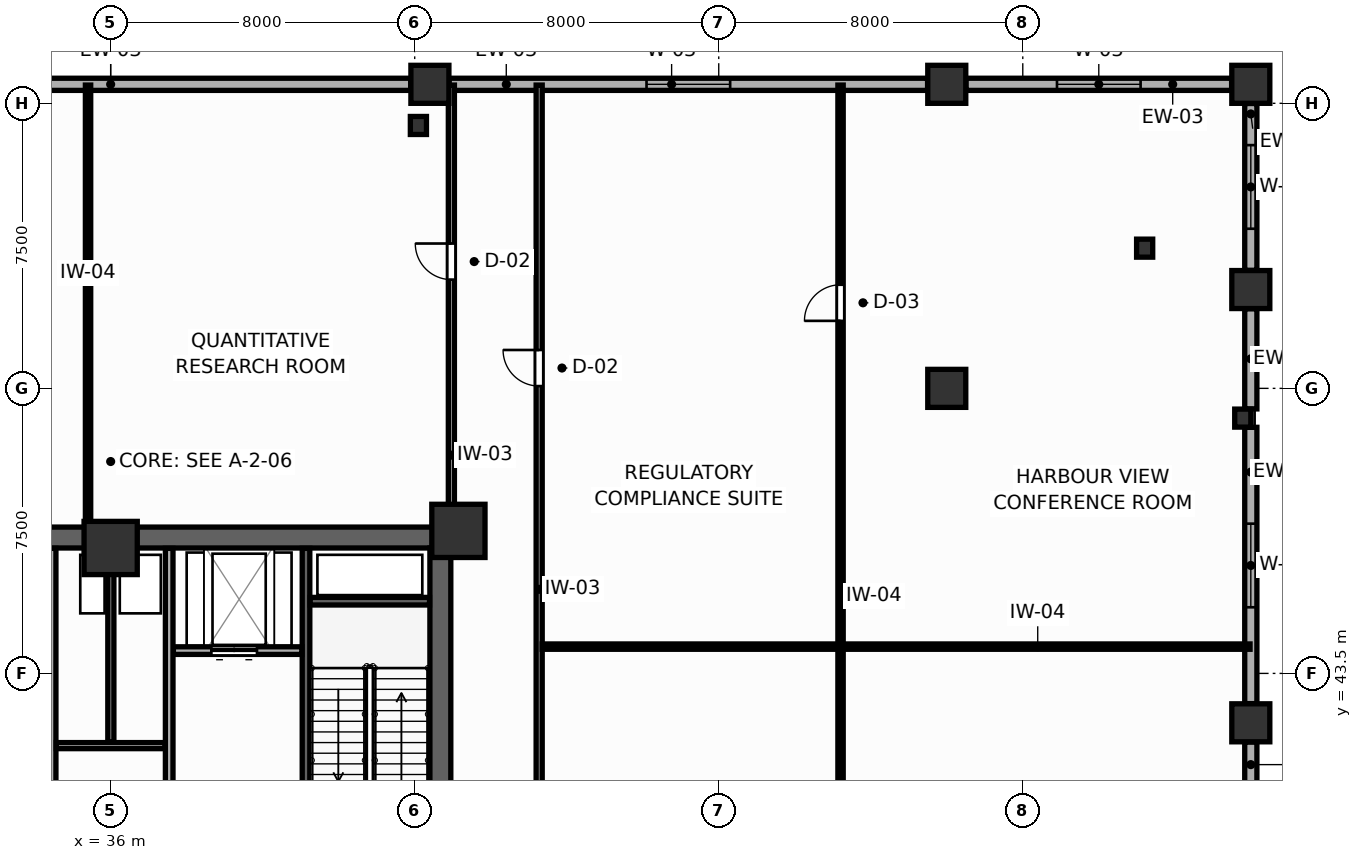
"""IFC4 building model, lengths in metres.
Left out: names, types, materials, properties, quantities, classifications, styles, units other than length and angle.
Written with IfcOpenShell. Run it as: python <this file> out.ifc"""

import sys

from ifc_helpers import new_model, si_unit, direction, frame, frame_2d, origin, origin_2d, place, context, subcontext, project, spatial, rectangle, i_section, extrude, source, transform, mapped, element, fill, save


model = new_model("IFC4")
c1 = context("Model", 3, precision=1e-05, world=origin(), true_north=direction((0.0, 1.0)))
c2 = subcontext(c1, "Body", "Model", "MODEL_VIEW")
j1 = project(units=[si_unit("LENGTHUNIT", "METRE"), si_unit("PLANEANGLEUNIT", "RADIAN")], contexts=[c1])
p1 = place(None, origin())
s1 = spatial("IfcSite", under=j1, at=p1, CompositionType="ELEMENT")
p2 = place(p1, origin())
s2 = spatial("IfcBuilding", under=s1, at=p2, CompositionType="ELEMENT")
p3 = place(p2, frame((0.0, 0.0, 14.4)))
s3 = spatial("IfcBuildingStorey", under=s2, at=p3, CompositionType="ELEMENT", Elevation=14.4)
p4 = place(p3, frame((27.05, 47.075, 0.0), z_axis=(0.0, 0.0, 1.0), x_axis=(1.0, 0.0, 0.0)))
e1 = element("IfcWall", 1, at=p4, inside=s3, PredefinedType="SHEAR", context=c2, shape_type="SweptSolid", body=[
    extrude(rectangle(XDim=17.9, YDim=0.55, at=frame_2d((8.95, 0.0))), origin(), (0.0, 0.0, 1.0), 4.8),
])
p5 = place(p3, frame((44.675, 37.8, 0.0), z_axis=(0.0, 0.0, 1.0), x_axis=(0.0, 1.0, 0.0)))
e2 = element("IfcWall", 2, at=p5, inside=s3, PredefinedType="SHEAR", context=c2, shape_type="SweptSolid", body=[
    extrude(rectangle(XDim=9.0, YDim=0.55, at=frame_2d((4.5, 0.0))), origin(), (0.0, 0.0, 1.0), 4.8),
])
m1 = source(origin(), c2, "Body", "SweptSolid", [
    extrude(rectangle(XDim=1.4, YDim=1.4, at=origin_2d()), origin(), (0.0, 0.0, 1.0), 4.8),
])
for number, where, z_axis, x_axis in (
    (3, (45.15, 47.25, 0.0), (0.0, 0.0, 1.0), (1.0, 0.0, 0.0)),
    (4, (36.0, 46.8, 0.0), (0.0, 0.0, 1.0), (1.0, 0.0, 0.0)),
):
    element("IfcColumn", number, at=place(p3, frame(where, z_axis=z_axis, x_axis=x_axis)), inside=s3, PredefinedType="COLUMN", context=c2, shape_type="MappedRepresentation", body=[
        mapped(m1, transform((0.0, 0.0, 0.0), scale=1.0)),
    ])
m2 = source(origin(), c2, "Body", "SweptSolid", [
    extrude(rectangle(XDim=1.0, YDim=1.0, at=origin_2d()), origin(), (0.0, 0.0, 1.0), 4.8),
])
for number, where, z_axis, x_axis in (
    (5, (66.0, 53.6, 0.0), (0.0, 0.0, 1.0), (1.0, 0.0, 0.0)),
    (6, (66.0, 59.0, 0.0), (0.0, 0.0, 1.0), (1.0, 0.0, 0.0)),
    (7, (44.4, 59.0, 0.0), (0.0, 0.0, 1.0), (1.0, 0.0, 0.0)),
    (8, (58.0, 59.0, 0.0), (0.0, 0.0, 1.0), (1.0, 0.0, 0.0)),
    (9, (58.0, 51.0, 0.0), (0.0, 0.0, 1.0), (1.0, 0.0, 0.0)),
    (10, (66.0, 42.2, 0.0), (0.0, 0.0, 1.0), (1.0, 0.0, 0.0)),
):
    element("IfcColumn", number, at=place(p3, frame(where, z_axis=z_axis, x_axis=x_axis)), inside=s3, PredefinedType="COLUMN", context=c2, shape_type="MappedRepresentation", body=[
        mapped(m2, transform((0.0, 0.0, 0.0), scale=1.0)),
    ])
m3 = source(origin(), c2, "Body", "SweptSolid", [
    extrude(i_section(OverallWidth=0.424, OverallDepth=0.474, WebThickness=0.045, FlangeThickness=0.072, FilletRadius=0.015, at=origin_2d()), origin(), (0.0, 0.0, 1.0), 4.8),
])
for number, where, z_axis, x_axis in (
    (11, (65.789, 50.217, 0.0), (0.0, 0.0, 1.0), (1.0, 0.0, 0.0)),
    (12, (63.207, 54.689, 0.0), (0.0, 0.0, 1.0), (1.0, 0.0, 0.0)),
    (13, (44.097, 57.917, 0.0), (0.0, 0.0, 1.0), (1.0, 0.0, 0.0)),
):
    element("IfcColumn", number, at=place(p3, frame(where, z_axis=z_axis, x_axis=x_axis)), inside=s3, PredefinedType="COLUMN", context=c2, shape_type="MappedRepresentation", body=[
        mapped(m3, transform((0.0, 0.0, 0.0), scale=1.0)),
    ])
p6 = place(p3, frame((28.105, 59.0, 0.0), z_axis=(0.0, 0.0, 1.0), x_axis=(1.0, 0.0, 0.0)))
e14 = element("IfcWall", 14, at=p6, inside=s3, PredefinedType="SOLIDWALL", context=c2, shape_type="SweptSolid", body=[
    extrude(rectangle(XDim=15.79, YDim=0.32, at=frame_2d((7.895, 0.0))), origin(), (0.0, 0.0, 1.0), 3.82),
])
p7 = place(p3, frame((44.905, 59.0, 0.0), z_axis=(0.0, 0.0, 1.0), x_axis=(1.0, 0.0, 0.0)))
e15 = element("IfcWall", 15, at=p7, inside=s3, PredefinedType="SOLIDWALL", context=c2, shape_type="SweptSolid", body=[
    extrude(rectangle(XDim=12.59, YDim=0.32, at=frame_2d((6.295, 0.0))), origin(), (0.0, 0.0, 1.0), 3.82),
])
p8 = place(p7, frame((5.195, 0.0, 0.75)))
e16 = element("IfcOpeningElement", 16, at=p8, cuts=e15, PredefinedType="OPENING", context=c2, shape_type="SweptSolid", body=[
    extrude(rectangle(XDim=2.2, YDim=2.0, at=frame_2d((1.1, 1.0))), frame((0.0, 0.17, 0.0), z_axis=(0.0, -1.0, 0.0), x_axis=(1.0, 0.0, 0.0)), (0.0, 0.0, 1.0), 0.34),
])
p9 = place(p3, frame((58.505, 59.0, 0.0), z_axis=(0.0, 0.0, 1.0), x_axis=(1.0, 0.0, 0.0)))
e17 = element("IfcWall", 17, at=p9, inside=s3, PredefinedType="SOLIDWALL", context=c2, shape_type="SweptSolid", body=[
    extrude(rectangle(XDim=6.99, YDim=0.32, at=frame_2d((3.495, 0.0))), origin(), (0.0, 0.0, 1.0), 3.82),
])
p10 = place(p9, frame((2.395, 0.0, 0.75)))
e18 = element("IfcOpeningElement", 18, at=p10, cuts=e17, PredefinedType="OPENING", context=c2, shape_type="SweptSolid", body=[
    extrude(rectangle(XDim=2.2, YDim=2.0, at=frame_2d((1.1, 1.0))), frame((0.0, 0.17, 0.0), z_axis=(0.0, -1.0, 0.0), x_axis=(1.0, 0.0, 0.0)), (0.0, 0.0, 1.0), 0.34),
])
p11 = place(p3, frame((66.0, 40.505, 0.0), z_axis=(0.0, 0.0, 1.0), x_axis=(0.0, 1.0, 0.0)))
e19 = element("IfcWall", 19, at=p11, inside=s3, PredefinedType="SOLIDWALL", context=c2, shape_type="SweptSolid", body=[
    extrude(rectangle(XDim=1.19, YDim=0.32, at=frame_2d((0.595, 0.0))), origin(), (0.0, 0.0, 1.0), 3.82),
])
p12 = place(p3, frame((66.0, 42.705, 0.0), z_axis=(0.0, 0.0, 1.0), x_axis=(0.0, 1.0, 0.0)))
e20 = element("IfcWall", 20, at=p12, inside=s3, PredefinedType="SOLIDWALL", context=c2, shape_type="SweptSolid", body=[
    extrude(rectangle(XDim=7.27, YDim=0.32, at=frame_2d((3.635, 0.0))), origin(), (0.0, 0.0, 1.0), 3.82),
])
p13 = place(p12, frame((2.535, 0.0, 0.75)))
e21 = element("IfcOpeningElement", 21, at=p13, cuts=e20, PredefinedType="OPENING", context=c2, shape_type="SweptSolid", body=[
    extrude(rectangle(XDim=2.2, YDim=2.0, at=frame_2d((1.1, 1.0))), frame((0.0, 0.17, 0.0), z_axis=(0.0, -1.0, 0.0), x_axis=(1.0, 0.0, 0.0)), (0.0, 0.0, 1.0), 0.34),
])
p14 = place(p3, frame((66.0, 50.459, 0.0), z_axis=(0.0, 0.0, 1.0), x_axis=(0.0, 1.0, 0.0)))
e22 = element("IfcWall", 22, at=p14, inside=s3, PredefinedType="SOLIDWALL", context=c2, shape_type="SweptSolid", body=[
    extrude(rectangle(XDim=2.636, YDim=0.32, at=frame_2d((1.318, 0.0))), origin(), (0.0, 0.0, 1.0), 3.82),
])
p15 = place(p3, frame((66.0, 54.105, 0.0), z_axis=(0.0, 0.0, 1.0), x_axis=(0.0, 1.0, 0.0)))
e23 = element("IfcWall", 23, at=p15, inside=s3, PredefinedType="SOLIDWALL", context=c2, shape_type="SweptSolid", body=[
    extrude(rectangle(XDim=4.39, YDim=0.32, at=frame_2d((2.195, 0.0))), origin(), (0.0, 0.0, 1.0), 3.82),
])
p16 = place(p15, frame((1.095, 0.0, 0.75)))
e24 = element("IfcOpeningElement", 24, at=p16, cuts=e23, PredefinedType="OPENING", context=c2, shape_type="SweptSolid", body=[
    extrude(rectangle(XDim=2.2, YDim=2.0, at=frame_2d((1.1, 1.0))), frame((0.0, 0.17, 0.0), z_axis=(0.0, -1.0, 0.0), x_axis=(1.0, 0.0, 0.0)), (0.0, 0.0, 1.0), 0.34),
])
p17 = place(p3, frame((41.14, 37.81, 0.0), z_axis=(0.0, 0.0, 1.0), x_axis=(0.0, 1.0, 0.0)))
e25 = element("IfcWall", 25, at=p17, inside=s3, PredefinedType="SHEAR", context=c2, shape_type="SweptSolid", body=[
    extrude(rectangle(XDim=8.98, YDim=0.2, at=frame_2d((4.49, 0.0))), origin(), (0.0, 0.0, 1.0), 4.8),
])
p18 = place(p17, frame((0.82, 0.0, 0.0)))
e26 = element("IfcOpeningElement", 26, at=p18, cuts=e25, PredefinedType="OPENING", context=c2, shape_type="SweptSolid", body=[
    extrude(rectangle(XDim=1.05, YDim=2.1, at=frame_2d((0.525, 1.05))), frame((0.0, 0.11, 0.0), z_axis=(0.0, -1.0, 0.0), x_axis=(1.0, 0.0, 0.0)), (0.0, 0.0, 1.0), 0.22),
])
p19 = place(p3, frame((41.25, 45.4, 0.0), z_axis=(0.0, 0.0, 1.0), x_axis=(1.0, 0.0, 0.0)))
e27 = element("IfcWall", 27, at=p19, inside=s3, PredefinedType="SHEAR", context=c2, shape_type="SweptSolid", body=[
    extrude(rectangle(XDim=3.14, YDim=0.2, at=frame_2d((1.57, 0.0))), origin(), (0.0, 0.0, 1.0), 4.8),
])
p20 = place(p3, frame((37.65, 44.1, 0.0), z_axis=(0.0, 0.0, 1.0), x_axis=(1.0, 0.0, 0.0)))
e28 = element("IfcWall", 28, at=p20, inside=s3, PredefinedType="PARTITIONING", context=c2, shape_type="SweptSolid", body=[
    extrude(rectangle(XDim=3.38, YDim=0.2, at=frame_2d((1.69, 0.0))), origin(), (0.0, 0.0, 1.0), 4.52),
])
p21 = place(p20, frame((1.0, 0.0, 0.0)))
e29 = element("IfcOpeningElement", 29, at=p21, cuts=e28, PredefinedType="OPENING", context=c2, shape_type="SweptSolid", body=[
    extrude(rectangle(XDim=1.2, YDim=2.1, at=frame_2d((0.6, 1.05))), frame((0.0, 0.11, 0.0), z_axis=(0.0, -1.0, 0.0), x_axis=(1.0, 0.0, 0.0)), (0.0, 0.0, 1.0), 0.22),
])
p22 = place(p3, frame((34.46, 37.81, 0.0), z_axis=(0.0, 0.0, 1.0), x_axis=(0.0, 1.0, 0.0)))
e30 = element("IfcWall", 30, at=p22, inside=s3, PredefinedType="PARTITIONING", context=c2, shape_type="SweptSolid", body=[
    extrude(rectangle(XDim=8.98, YDim=0.2, at=frame_2d((4.49, 0.0))), origin(), (0.0, 0.0, 1.0), 4.52),
])
p23 = place(p22, frame((0.65, 0.0, 0.0)))
e31 = element("IfcOpeningElement", 31, at=p23, cuts=e30, PredefinedType="OPENING", context=c2, shape_type="SweptSolid", body=[
    extrude(rectangle(XDim=0.85, YDim=2.05, at=frame_2d((0.425, 1.025))), frame((0.0, 0.11, 0.0), z_axis=(0.0, -1.0, 0.0), x_axis=(1.0, 0.0, 0.0)), (0.0, 0.0, 1.0), 0.22),
])
p24 = place(p3, frame((37.54, 37.81, 0.0), z_axis=(0.0, 0.0, 1.0), x_axis=(0.0, 1.0, 0.0)))
e32 = element("IfcWall", 32, at=p24, inside=s3, PredefinedType="PARTITIONING", context=c2, shape_type="SweptSolid", body=[
    extrude(rectangle(XDim=8.98, YDim=0.2, at=frame_2d((4.49, 0.0))), origin(), (0.0, 0.0, 1.0), 4.52),
])
p25 = place(p24, frame((0.65, 0.0, 0.0)))
e33 = element("IfcOpeningElement", 33, at=p25, cuts=e32, PredefinedType="OPENING", context=c2, shape_type="SweptSolid", body=[
    extrude(rectangle(XDim=0.85, YDim=2.05, at=frame_2d((0.425, 1.025))), frame((0.0, 0.11, 0.0), z_axis=(0.0, -1.0, 0.0), x_axis=(1.0, 0.0, 0.0)), (0.0, 0.0, 1.0), 0.22),
])
p26 = place(p3, frame((34.57, 41.6, 0.0), z_axis=(0.0, 0.0, 1.0), x_axis=(1.0, 0.0, 0.0)))
e34 = element("IfcWall", 34, at=p26, inside=s3, PredefinedType="PARTITIONING", context=c2, shape_type="SweptSolid", body=[
    extrude(rectangle(XDim=2.86, YDim=0.16, at=frame_2d((1.43, 0.0))), origin(), (0.0, 0.0, 1.0), 4.52),
])
p27 = place(p3, frame((36.005, 41.69, 0.0), z_axis=(0.0, 0.0, 1.0), x_axis=(0.0, 1.0, 0.0)))
e35 = element("IfcWall", 35, at=p27, inside=s3, PredefinedType="PARTITIONING", context=c2, shape_type="SweptSolid", body=[
    extrude(rectangle(XDim=5.1, YDim=0.16, at=frame_2d((2.55, 0.0))), origin(), (0.0, 0.0, 1.0), 4.52),
])
p28 = place(p3, frame((47.275, 32.27, 0.0), z_axis=(0.0, 0.0, 1.0), x_axis=(0.0, 1.0, 0.0)))
e36 = element("IfcWall", 36, at=p28, inside=s3, PredefinedType="PARTITIONING", context=c2, shape_type="SweptSolid", body=[
    extrude(rectangle(XDim=26.71, YDim=0.16, at=frame_2d((13.355, 0.0))), origin(), (0.0, 0.0, 1.0), 4.52),
])
p29 = place(p28, frame((7.145, 0.0, 0.0)))
e37 = element("IfcOpeningElement", 37, at=p29, cuts=e36, PredefinedType="OPENING", context=c2, shape_type="SweptSolid", body=[
    extrude(rectangle(XDim=0.95, YDim=2.05, at=frame_2d((0.475, 1.025))), frame((0.0, 0.09, 0.0), z_axis=(0.0, -1.0, 0.0), x_axis=(1.0, 0.0, 0.0)), (0.0, 0.0, 1.0), 0.18),
])
p30 = place(p28, frame((18.79, 0.0, 0.0)))
e38 = element("IfcOpeningElement", 38, at=p30, cuts=e36, PredefinedType="OPENING", context=c2, shape_type="SweptSolid", body=[
    extrude(rectangle(XDim=0.95, YDim=2.05, at=frame_2d((0.475, 1.025))), frame((0.0, 0.09, 0.0), z_axis=(0.0, -1.0, 0.0), x_axis=(1.0, 0.0, 0.0)), (0.0, 0.0, 1.0), 0.18),
])
p31 = place(p3, frame((44.965, 47.34, 0.0), z_axis=(0.0, 0.0, 1.0), x_axis=(0.0, 1.0, 0.0)))
e39 = element("IfcWall", 39, at=p31, inside=s3, PredefinedType="PARTITIONING", context=c2, shape_type="SweptSolid", body=[
    extrude(rectangle(XDim=11.64, YDim=0.16, at=frame_2d((5.82, 0.0))), origin(), (0.0, 0.0, 1.0), 4.52),
])
p32 = place(p31, frame((6.521, 0.0, 0.0)))
e40 = element("IfcOpeningElement", 40, at=p32, cuts=e39, PredefinedType="OPENING", context=c2, shape_type="SweptSolid", body=[
    extrude(rectangle(XDim=0.95, YDim=2.05, at=frame_2d((0.475, 1.025))), frame((0.0, 0.09, 0.0), z_axis=(0.0, -1.0, 0.0), x_axis=(1.0, 0.0, 0.0)), (0.0, 0.0, 1.0), 0.18),
])
p33 = place(p3, frame((55.205, 32.357, 0.0), z_axis=(0.0, 0.0, 1.0), x_axis=(0.0, 1.0, 0.0)))
e41 = element("IfcWall", 41, at=p33, inside=s3, PredefinedType="PARTITIONING", context=c2, shape_type="SweptSolid", body=[
    extrude(rectangle(XDim=26.623, YDim=0.14, at=frame_2d((13.312, 0.0))), origin(), (0.0, 0.0, 1.0), 4.52),
])
p34 = place(p33, frame((4.973, 0.0, 0.0)))
e42 = element("IfcOpeningElement", 42, at=p34, cuts=e41, PredefinedType="OPENING", context=c2, shape_type="SweptSolid", body=[
    extrude(rectangle(XDim=0.95, YDim=2.05, at=frame_2d((0.475, 1.025))), frame((0.0, 0.08, 0.0), z_axis=(0.0, -1.0, 0.0), x_axis=(1.0, 0.0, 0.0)), (0.0, 0.0, 1.0), 0.16),
])
p35 = place(p33, frame((20.419, 0.0, 0.0)))
e43 = element("IfcOpeningElement", 43, at=p35, cuts=e41, PredefinedType="OPENING", context=c2, shape_type="SweptSolid", body=[
    extrude(rectangle(XDim=0.95, YDim=2.05, at=frame_2d((0.475, 1.025))), frame((0.0, 0.08, 0.0), z_axis=(0.0, -1.0, 0.0), x_axis=(1.0, 0.0, 0.0)), (0.0, 0.0, 1.0), 0.16),
])
p36 = place(p3, frame((47.357, 44.205, 0.0), z_axis=(0.0, 0.0, 1.0), x_axis=(1.0, 0.0, 0.0)))
e44 = element("IfcWall", 44, at=p36, inside=s3, PredefinedType="PARTITIONING", context=c2, shape_type="SweptSolid", body=[
    extrude(rectangle(XDim=18.623, YDim=0.14, at=frame_2d((9.312, 0.0))), origin(), (0.0, 0.0, 1.0), 4.52),
])
p37 = place(p3, frame((35.405, 47.352, 0.0), z_axis=(0.0, 0.0, 1.0), x_axis=(0.0, 1.0, 0.0)))
e45 = element("IfcWall", 45, at=p37, inside=s3, PredefinedType="PARTITIONING", context=c2, shape_type="SweptSolid", body=[
    extrude(rectangle(XDim=11.628, YDim=0.14, at=frame_2d((5.814, 0.0))), origin(), (0.0, 0.0, 1.0), 4.52),
])
p38 = place(p8, origin())
e46 = element("IfcWindow", 46, at=p38, inside=s3, PartitioningType="SINGLE_PANEL", PredefinedType="WINDOW", context=c2, shape_type="SweptSolid", body=[
    extrude(rectangle(XDim=2.2, YDim=2.0, at=frame_2d((1.1, 1.0))), frame((0.0, 0.03, 0.0), z_axis=(0.0, -1.0, 0.0), x_axis=(1.0, 0.0, 0.0)), (0.0, 0.0, 1.0), 0.06),
])
fill(e16, e46)
p39 = place(p10, origin())
e47 = element("IfcWindow", 47, at=p39, inside=s3, PartitioningType="SINGLE_PANEL", PredefinedType="WINDOW", context=c2, shape_type="SweptSolid", body=[
    extrude(rectangle(XDim=2.2, YDim=2.0, at=frame_2d((1.1, 1.0))), frame((0.0, 0.03, 0.0), z_axis=(0.0, -1.0, 0.0), x_axis=(1.0, 0.0, 0.0)), (0.0, 0.0, 1.0), 0.06),
])
fill(e18, e47)
p40 = place(p13, origin())
e48 = element("IfcWindow", 48, at=p40, inside=s3, PartitioningType="SINGLE_PANEL", PredefinedType="WINDOW", context=c2, shape_type="SweptSolid", body=[
    extrude(rectangle(XDim=2.2, YDim=2.0, at=frame_2d((1.1, 1.0))), frame((0.0, 0.03, 0.0), z_axis=(0.0, -1.0, 0.0), x_axis=(1.0, 0.0, 0.0)), (0.0, 0.0, 1.0), 0.06),
])
fill(e21, e48)
p41 = place(p16, origin())
e49 = element("IfcWindow", 49, at=p41, inside=s3, PartitioningType="SINGLE_PANEL", PredefinedType="WINDOW", context=c2, shape_type="SweptSolid", body=[
    extrude(rectangle(XDim=2.2, YDim=2.0, at=frame_2d((1.1, 1.0))), frame((0.0, 0.03, 0.0), z_axis=(0.0, -1.0, 0.0), x_axis=(1.0, 0.0, 0.0)), (0.0, 0.0, 1.0), 0.06),
])
fill(e24, e49)
p42 = place(p21, origin())
e50 = element("IfcDoor", 50, at=p42, inside=s3, OperationType="DOUBLE_DOOR_SLIDING", PredefinedType="DOOR", context=c2, shape_type="SweptSolid", body=[
    extrude(rectangle(XDim=1.2, YDim=2.1, at=frame_2d((0.6, 1.05))), frame((0.0, 0.025, 0.0), z_axis=(0.0, -1.0, 0.0), x_axis=(1.0, 0.0, 0.0)), (0.0, 0.0, 1.0), 0.05),
])
fill(e29, e50)
p43 = place(p30, origin())
e51 = element("IfcDoor", 51, at=p43, inside=s3, OperationType="SINGLE_SWING_RIGHT", PredefinedType="DOOR", context=c2, shape_type="SweptSolid", body=[
    extrude(rectangle(XDim=0.95, YDim=2.05, at=frame_2d((0.475, 1.025))), frame((0.0, 0.025, 0.0), z_axis=(0.0, -1.0, 0.0), x_axis=(1.0, 0.0, 0.0)), (0.0, 0.0, 1.0), 0.05),
])
fill(e38, e51)
p44 = place(p32, origin())
e52 = element("IfcDoor", 52, at=p44, inside=s3, OperationType="SINGLE_SWING_RIGHT", PredefinedType="DOOR", context=c2, shape_type="SweptSolid", body=[
    extrude(rectangle(XDim=0.95, YDim=2.05, at=frame_2d((0.475, 1.025))), frame((0.0, 0.025, 0.0), z_axis=(0.0, -1.0, 0.0), x_axis=(1.0, 0.0, 0.0)), (0.0, 0.0, 1.0), 0.05),
])
fill(e40, e52)
p45 = place(p35, origin())
e53 = element("IfcDoor", 53, at=p45, inside=s3, OperationType="SINGLE_SWING_LEFT", PredefinedType="DOOR", context=c2, shape_type="SweptSolid", body=[
    extrude(rectangle(XDim=0.95, YDim=2.05, at=frame_2d((0.475, 1.025))), frame((0.0, 0.025, 0.0), z_axis=(0.0, -1.0, 0.0), x_axis=(1.0, 0.0, 0.0)), (0.0, 0.0, 1.0), 0.05),
])
fill(e43, e53)
save(model, sys.argv[1])
